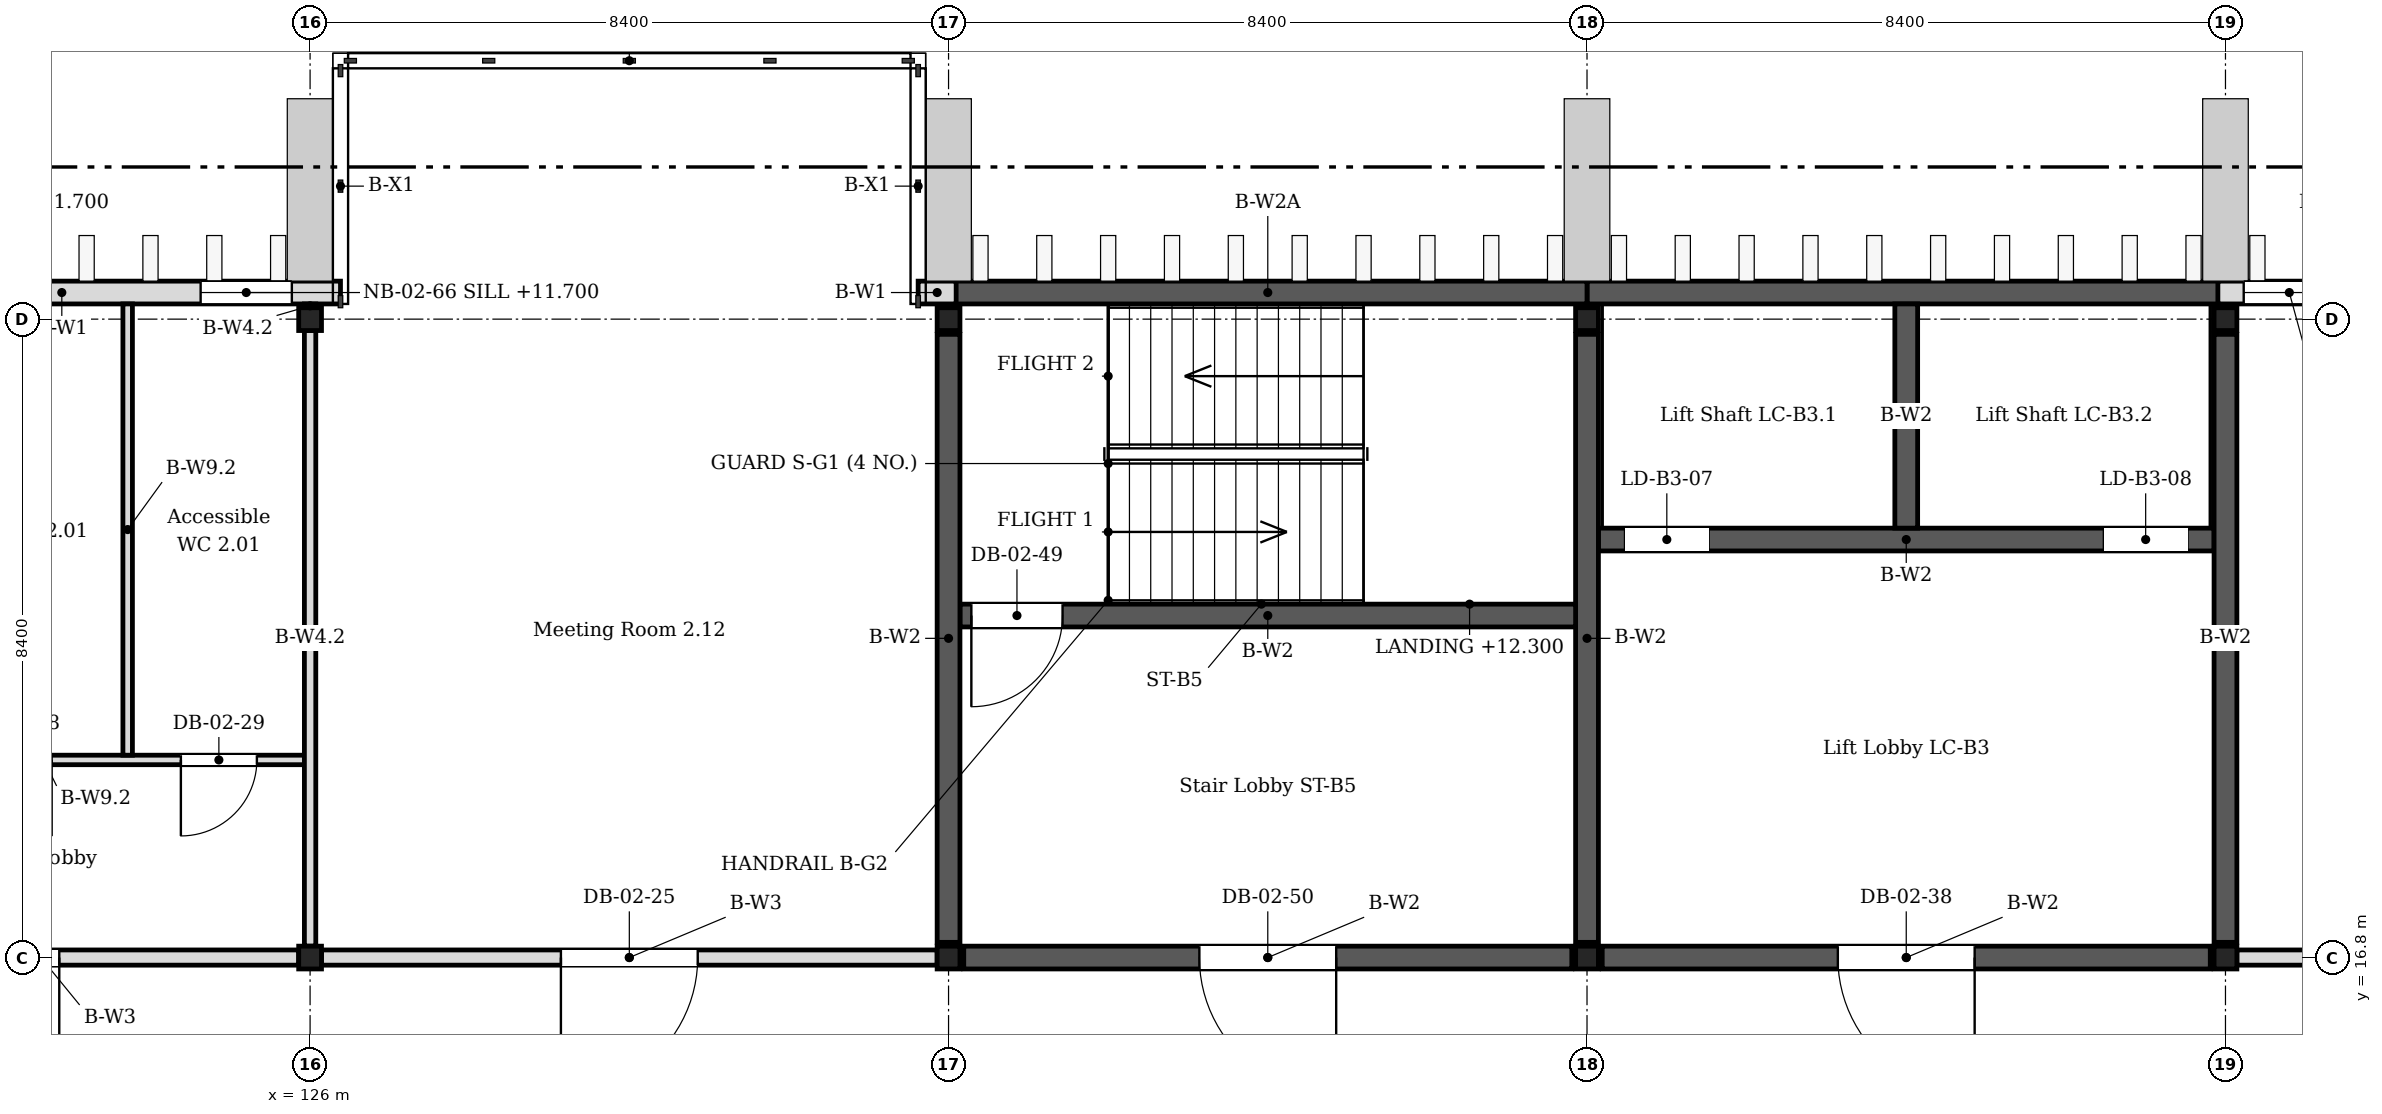
"""IFC4 building model, lengths in metres.
Left out: names, types, materials, properties, quantities, classifications, styles, units other than length and angle.
Written with IfcOpenShell. Run it as: python <this file> out.ifc"""

import sys

from ifc_helpers import new_model, si_unit, direction, frame, frame_2d, origin, origin_2d, place, context, subcontext, project, spatial, rectangle, i_section, extrude, element, fill, save


model = new_model("IFC4")
c1 = context("Model", 3, precision=1e-05, world=origin(), true_north=direction((0.0, 1.0)))
c2 = subcontext(c1, "Body", "Model", "MODEL_VIEW")
j1 = project(units=[si_unit("LENGTHUNIT", "METRE"), si_unit("PLANEANGLEUNIT", "RADIAN")], contexts=[c1])
p1 = place(None, origin())
s1 = spatial("IfcSite", under=j1, at=p1, CompositionType="ELEMENT")
p2 = place(p1, origin())
s2 = spatial("IfcBuilding", under=s1, at=p2, CompositionType="ELEMENT")
p3 = place(p2, frame((0.0, 0.0, 10.2)))
s3 = spatial("IfcBuildingStorey", under=s2, at=p3, CompositionType="ELEMENT", Elevation=10.2)
for number, where, z_axis, x_axis in (
    (1, (126.0, 16.8, 0.0), (0.0, 0.0, 1.0), (1.0, 0.0, 0.0)),
    (2, (126.0, 25.2, 0.0), (0.0, 0.0, 1.0), (1.0, 0.0, 0.0)),
    (3, (134.4, 16.8, 0.0), (0.0, 0.0, 1.0), (1.0, 0.0, 0.0)),
    (4, (134.4, 25.2, 0.0), (0.0, 0.0, 1.0), (1.0, 0.0, 0.0)),
    (5, (142.8, 16.8, 0.0), (0.0, 0.0, 1.0), (1.0, 0.0, 0.0)),
    (6, (142.8, 25.2, 0.0), (0.0, 0.0, 1.0), (1.0, 0.0, 0.0)),
    (7, (151.2, 16.8, 0.0), (0.0, 0.0, 1.0), (1.0, 0.0, 0.0)),
    (8, (151.2, 25.2, 0.0), (0.0, 0.0, 1.0), (1.0, 0.0, 0.0)),
):
    element("IfcColumn", number, at=place(p3, frame(where, z_axis=z_axis, x_axis=x_axis)), inside=s3, PredefinedType="COLUMN", context=c2, shape_type="SweptSolid", body=[
        extrude(i_section(OverallWidth=0.3, OverallDepth=0.3, WebThickness=0.01, FlangeThickness=0.015, FilletRadius=0.013, at=origin_2d()), origin(), (0.0, 0.0, 1.0), 4.2),
    ])
for number, where, z_axis, x_axis in (
    (9, (142.8, 17.0, 0.0), (0.0, 0.0, 1.0), (0.0, 1.0, 0.0)),
    (10, (151.2, 17.0, 0.0), (0.0, 0.0, 1.0), (0.0, 1.0, 0.0)),
):
    element("IfcWall", number, at=place(p3, frame(where, z_axis=z_axis, x_axis=x_axis)), inside=s3, PredefinedType="SHEAR", context=c2, shape_type="SweptSolid", body=[
        extrude(rectangle(XDim=8.0, YDim=0.3, at=frame_2d((4.0, 0.0))), origin(), (0.0, 0.0, 1.0), 4.05),
    ])
p4 = place(p3, frame((143.0, 16.8, 0.0), z_axis=(0.0, 0.0, 1.0), x_axis=(1.0, 0.0, 0.0)))
e11 = element("IfcWall", 11, at=p4, inside=s3, PredefinedType="SHEAR", context=c2, shape_type="SweptSolid", body=[
    extrude(rectangle(XDim=8.0, YDim=0.3, at=frame_2d((4.0, 0.0))), origin(), (0.0, 0.0, 1.0), 4.05),
])
p5 = place(p4, frame((3.1, 0.0, 0.0)))
e12 = element("IfcOpeningElement", 12, at=p5, cuts=e11, PredefinedType="OPENING", context=c2, shape_type="SweptSolid", body=[
    extrude(rectangle(XDim=1.8, YDim=2.1, at=frame_2d((0.9, 1.05))), frame((0.0, 0.16, 0.0), z_axis=(0.0, -1.0, 0.0), x_axis=(1.0, 0.0, 0.0)), (0.0, 0.0, 1.0), 0.32),
])
p6 = place(p3, frame((142.95, 22.3, 0.0), z_axis=(0.0, 0.0, 1.0), x_axis=(1.0, 0.0, 0.0)))
e13 = element("IfcWall", 13, at=p6, inside=s3, PredefinedType="SHEAR", context=c2, shape_type="SweptSolid", body=[
    extrude(rectangle(XDim=8.1, YDim=0.3, at=frame_2d((4.05, 0.0))), origin(), (0.0, 0.0, 1.0), 4.05),
])
p7 = place(p6, frame((0.35, 0.0, 0.0)))
e14 = element("IfcOpeningElement", 14, at=p7, cuts=e13, PredefinedType="OPENING", context=c2, shape_type="SweptSolid", body=[
    extrude(rectangle(XDim=1.1, YDim=2.2, at=frame_2d((0.55, 1.1))), frame((0.0, 0.16, 0.0), z_axis=(0.0, -1.0, 0.0), x_axis=(1.0, 0.0, 0.0)), (0.0, 0.0, 1.0), 0.32),
])
p8 = place(p6, frame((6.65, 0.0, 0.0)))
e15 = element("IfcOpeningElement", 15, at=p8, cuts=e13, PredefinedType="OPENING", context=c2, shape_type="SweptSolid", body=[
    extrude(rectangle(XDim=1.1, YDim=2.2, at=frame_2d((0.55, 1.1))), frame((0.0, 0.16, 0.0), z_axis=(0.0, -1.0, 0.0), x_axis=(1.0, 0.0, 0.0)), (0.0, 0.0, 1.0), 0.32),
])
p9 = place(p3, frame((142.8, 25.55, 0.0), z_axis=(0.0, 0.0, 1.0), x_axis=(1.0, 0.0, 0.0)))
e16 = element("IfcWall", 16, at=p9, inside=s3, PredefinedType="SHEAR", context=c2, shape_type="SweptSolid", body=[
    extrude(rectangle(XDim=8.4, YDim=0.3, at=frame_2d((4.2, 0.0))), origin(), (0.0, 0.0, 1.0), 4.05),
])
p10 = place(p3, frame((147.0, 22.45, 0.0), z_axis=(0.0, 0.0, 1.0), x_axis=(0.0, 1.0, 0.0)))
e17 = element("IfcWall", 17, at=p10, inside=s3, PredefinedType="SHEAR", context=c2, shape_type="SweptSolid", body=[
    extrude(rectangle(XDim=2.95, YDim=0.3, at=frame_2d((1.475, 0.0))), origin(), (0.0, 0.0, 1.0), 4.05),
])
p11 = place(p3, frame((134.4, 17.0, 0.0), z_axis=(0.0, 0.0, 1.0), x_axis=(0.0, 1.0, 0.0)))
e18 = element("IfcWall", 18, at=p11, inside=s3, PredefinedType="SHEAR", context=c2, shape_type="SweptSolid", body=[
    extrude(rectangle(XDim=8.0, YDim=0.3, at=frame_2d((4.0, 0.0))), origin(), (0.0, 0.0, 1.0), 4.05),
])
p12 = place(p3, frame((134.6, 16.8, 0.0), z_axis=(0.0, 0.0, 1.0), x_axis=(1.0, 0.0, 0.0)))
e19 = element("IfcWall", 19, at=p12, inside=s3, PredefinedType="SHEAR", context=c2, shape_type="SweptSolid", body=[
    extrude(rectangle(XDim=8.0, YDim=0.3, at=frame_2d((4.0, 0.0))), origin(), (0.0, 0.0, 1.0), 4.05),
])
p13 = place(p12, frame((3.1, 0.0, 0.0)))
e20 = element("IfcOpeningElement", 20, at=p13, cuts=e19, PredefinedType="OPENING", context=c2, shape_type="SweptSolid", body=[
    extrude(rectangle(XDim=1.8, YDim=2.1, at=frame_2d((0.9, 1.05))), frame((0.0, 0.16, 0.0), z_axis=(0.0, -1.0, 0.0), x_axis=(1.0, 0.0, 0.0)), (0.0, 0.0, 1.0), 0.32),
])
p14 = place(p3, frame((134.55, 21.3, 0.0), z_axis=(0.0, 0.0, 1.0), x_axis=(1.0, 0.0, 0.0)))
e21 = element("IfcWall", 21, at=p14, inside=s3, PredefinedType="SHEAR", context=c2, shape_type="SweptSolid", body=[
    extrude(rectangle(XDim=8.1, YDim=0.3, at=frame_2d((4.05, 0.0))), origin(), (0.0, 0.0, 1.0), 4.05),
])
p15 = place(p14, frame((0.15, 0.0, 0.0)))
e22 = element("IfcOpeningElement", 22, at=p15, cuts=e21, PredefinedType="OPENING", context=c2, shape_type="SweptSolid", body=[
    extrude(rectangle(XDim=1.2, YDim=2.1, at=frame_2d((0.6, 1.05))), frame((0.0, 0.16, 0.0), z_axis=(0.0, -1.0, 0.0), x_axis=(1.0, 0.0, 0.0)), (0.0, 0.0, 1.0), 0.32),
])
p16 = place(p3, frame((134.4, 25.55, 0.0), z_axis=(0.0, 0.0, 1.0), x_axis=(1.0, 0.0, 0.0)))
e23 = element("IfcWall", 23, at=p16, inside=s3, PredefinedType="SHEAR", context=c2, shape_type="SweptSolid", body=[
    extrude(rectangle(XDim=8.4, YDim=0.3, at=frame_2d((4.2, 0.0))), origin(), (0.0, 0.0, 1.0), 4.05),
])
p17 = place(p3, frame((117.5, 25.55, 0.0), z_axis=(0.0, 0.0, 1.0), x_axis=(1.0, 0.0, 0.0)))
e24 = element("IfcWall", 24, at=p17, inside=s3, PredefinedType="SOLIDWALL", context=c2, shape_type="SweptSolid", body=[
    extrude(rectangle(XDim=8.9, YDim=0.3, at=frame_2d((4.45, 0.0))), origin(), (0.0, 0.0, 1.0), 4.05),
])
p18 = place(p17, frame((0.34, 0.0, 1.5)))
e25 = element("IfcOpeningElement", 25, at=p18, cuts=e24, PredefinedType="OPENING", context=c2, shape_type="SweptSolid", body=[
    extrude(rectangle(XDim=1.2, YDim=1.2, at=frame_2d((0.6, 0.6))), frame((0.0, 0.16, 0.0), z_axis=(0.0, -1.0, 0.0), x_axis=(1.0, 0.0, 0.0)), (0.0, 0.0, 1.0), 0.32),
])
p19 = place(p17, frame((3.7, 0.0, 1.5)))
e26 = element("IfcOpeningElement", 26, at=p19, cuts=e24, PredefinedType="OPENING", context=c2, shape_type="SweptSolid", body=[
    extrude(rectangle(XDim=1.2, YDim=1.2, at=frame_2d((0.6, 0.6))), frame((0.0, 0.16, 0.0), z_axis=(0.0, -1.0, 0.0), x_axis=(1.0, 0.0, 0.0)), (0.0, 0.0, 1.0), 0.32),
])
p20 = place(p17, frame((7.06, 0.0, 1.5)))
e27 = element("IfcOpeningElement", 27, at=p20, cuts=e24, PredefinedType="OPENING", context=c2, shape_type="SweptSolid", body=[
    extrude(rectangle(XDim=1.2, YDim=1.2, at=frame_2d((0.6, 0.6))), frame((0.0, 0.16, 0.0), z_axis=(0.0, -1.0, 0.0), x_axis=(1.0, 0.0, 0.0)), (0.0, 0.0, 1.0), 0.32),
])
p21 = place(p3, frame((134.0, 25.55, 0.0), z_axis=(0.0, 0.0, 1.0), x_axis=(1.0, 0.0, 0.0)))
e28 = element("IfcWall", 28, at=p21, inside=s3, PredefinedType="SOLIDWALL", context=c2, shape_type="SweptSolid", body=[
    extrude(rectangle(XDim=0.5, YDim=0.3, at=frame_2d((0.25, 0.0))), origin(), (0.0, 0.0, 1.0), 4.05),
])
p22 = place(p3, frame((151.1, 25.55, 0.0), z_axis=(0.0, 0.0, 1.0), x_axis=(1.0, 0.0, 0.0)))
e29 = element("IfcWall", 29, at=p22, inside=s3, PredefinedType="SOLIDWALL", context=c2, shape_type="SweptSolid", body=[
    extrude(rectangle(XDim=5.9, YDim=0.3, at=frame_2d((2.95, 0.0))), origin(), (0.0, 0.0, 1.0), 4.05),
])
p23 = place(p22, frame((0.34, 0.0, 1.5)))
e30 = element("IfcOpeningElement", 30, at=p23, cuts=e29, PredefinedType="OPENING", context=c2, shape_type="SweptSolid", body=[
    extrude(rectangle(XDim=1.2, YDim=1.2, at=frame_2d((0.6, 0.6))), frame((0.0, 0.16, 0.0), z_axis=(0.0, -1.0, 0.0), x_axis=(1.0, 0.0, 0.0)), (0.0, 0.0, 1.0), 0.32),
])
p24 = place(p22, frame((2.02, 0.0, 1.5)))
e31 = element("IfcOpeningElement", 31, at=p24, cuts=e29, PredefinedType="OPENING", context=c2, shape_type="SweptSolid", body=[
    extrude(rectangle(XDim=1.2, YDim=1.2, at=frame_2d((0.6, 0.6))), frame((0.0, 0.16, 0.0), z_axis=(0.0, -1.0, 0.0), x_axis=(1.0, 0.0, 0.0)), (0.0, 0.0, 1.0), 0.32),
])
p25 = place(p22, frame((3.7, 0.0, 1.5)))
e32 = element("IfcOpeningElement", 32, at=p25, cuts=e29, PredefinedType="OPENING", context=c2, shape_type="SweptSolid", body=[
    extrude(rectangle(XDim=1.2, YDim=1.2, at=frame_2d((0.6, 0.6))), frame((0.0, 0.16, 0.0), z_axis=(0.0, -1.0, 0.0), x_axis=(1.0, 0.0, 0.0)), (0.0, 0.0, 1.0), 0.32),
])
p26 = place(p3, frame((117.75, 16.8, 0.0), z_axis=(0.0, 0.0, 1.0), x_axis=(1.0, 0.0, 0.0)))
e33 = element("IfcWall", 33, at=p26, inside=s3, PredefinedType="PARTITIONING", context=c2, shape_type="SweptSolid", body=[
    extrude(rectangle(XDim=8.1, YDim=0.2, at=frame_2d((4.05, 0.0))), origin(), (0.0, 0.0, 1.0), 3.35),
])
p27 = place(p26, frame((3.15, 0.0, 0.0)))
e34 = element("IfcOpeningElement", 34, at=p27, cuts=e33, PredefinedType="OPENING", context=c2, shape_type="SweptSolid", body=[
    extrude(rectangle(XDim=1.8, YDim=2.1, at=frame_2d((0.9, 1.05))), frame((0.0, 0.11, 0.0), z_axis=(0.0, -1.0, 0.0), x_axis=(1.0, 0.0, 0.0)), (0.0, 0.0, 1.0), 0.22),
])
p28 = place(p3, frame((126.15, 16.8, 0.0), z_axis=(0.0, 0.0, 1.0), x_axis=(1.0, 0.0, 0.0)))
e35 = element("IfcWall", 35, at=p28, inside=s3, PredefinedType="PARTITIONING", context=c2, shape_type="SweptSolid", body=[
    extrude(rectangle(XDim=8.1, YDim=0.2, at=frame_2d((4.05, 0.0))), origin(), (0.0, 0.0, 1.0), 3.35),
])
p29 = place(p28, frame((3.15, 0.0, 0.0)))
e36 = element("IfcOpeningElement", 36, at=p29, cuts=e35, PredefinedType="OPENING", context=c2, shape_type="SweptSolid", body=[
    extrude(rectangle(XDim=1.8, YDim=2.1, at=frame_2d((0.9, 1.05))), frame((0.0, 0.11, 0.0), z_axis=(0.0, -1.0, 0.0), x_axis=(1.0, 0.0, 0.0)), (0.0, 0.0, 1.0), 0.22),
])
p30 = place(p3, frame((151.35, 16.8, 0.0), z_axis=(0.0, 0.0, 1.0), x_axis=(1.0, 0.0, 0.0)))
e37 = element("IfcWall", 37, at=p30, inside=s3, PredefinedType="PARTITIONING", context=c2, shape_type="SweptSolid", body=[
    extrude(rectangle(XDim=5.85, YDim=0.2, at=frame_2d((2.925, 0.0))), origin(), (0.0, 0.0, 1.0), 3.35),
])
p31 = place(p30, frame((3.55, 0.0, 0.0)))
e38 = element("IfcOpeningElement", 38, at=p31, cuts=e37, PredefinedType="OPENING", context=c2, shape_type="SweptSolid", body=[
    extrude(rectangle(XDim=1.0, YDim=2.1, at=frame_2d((0.5, 1.05))), frame((0.0, 0.11, 0.0), z_axis=(0.0, -1.0, 0.0), x_axis=(1.0, 0.0, 0.0)), (0.0, 0.0, 1.0), 0.22),
])
p32 = place(p3, frame((117.75, 19.4, 0.0), z_axis=(0.0, 0.0, 1.0), x_axis=(1.0, 0.0, 0.0)))
e39 = element("IfcWall", 39, at=p32, inside=s3, PredefinedType="PARTITIONING", context=c2, shape_type="SweptSolid", body=[
    extrude(rectangle(XDim=8.175, YDim=0.125, at=frame_2d((4.087, 0.0))), origin(), (0.0, 0.0, 1.0), 3.35),
])
p33 = place(p32, frame((0.85, 0.0, 0.0)))
e40 = element("IfcOpeningElement", 40, at=p33, cuts=e39, PredefinedType="OPENING", context=c2, shape_type="SweptSolid", body=[
    extrude(rectangle(XDim=1.0, YDim=2.1, at=frame_2d((0.5, 1.05))), frame((0.0, 0.073, 0.0), z_axis=(0.0, -1.0, 0.0), x_axis=(1.0, 0.0, 0.0)), (0.0, 0.0, 1.0), 0.145),
])
p34 = place(p32, frame((3.85, 0.0, 0.0)))
e41 = element("IfcOpeningElement", 41, at=p34, cuts=e39, PredefinedType="OPENING", context=c2, shape_type="SweptSolid", body=[
    extrude(rectangle(XDim=1.0, YDim=2.1, at=frame_2d((0.5, 1.05))), frame((0.0, 0.073, 0.0), z_axis=(0.0, -1.0, 0.0), x_axis=(1.0, 0.0, 0.0)), (0.0, 0.0, 1.0), 0.145),
])
p35 = place(p32, frame((6.55, 0.0, 0.0)))
e42 = element("IfcOpeningElement", 42, at=p35, cuts=e39, PredefinedType="OPENING", context=c2, shape_type="SweptSolid", body=[
    extrude(rectangle(XDim=1.0, YDim=2.1, at=frame_2d((0.5, 1.05))), frame((0.0, 0.073, 0.0), z_axis=(0.0, -1.0, 0.0), x_axis=(1.0, 0.0, 0.0)), (0.0, 0.0, 1.0), 0.145),
])
p36 = place(p3, frame((123.6, 19.462, 0.0), z_axis=(0.0, 0.0, 1.0), x_axis=(0.0, 1.0, 0.0)))
e43 = element("IfcWall", 43, at=p36, inside=s3, PredefinedType="PARTITIONING", context=c2, shape_type="SweptSolid", body=[
    extrude(rectangle(XDim=5.938, YDim=0.125, at=frame_2d((2.969, 0.0))), origin(), (0.0, 0.0, 1.0), 3.35),
])
p37 = place(p3, frame((126.0, 16.95, 0.0), z_axis=(0.0, 0.0, 1.0), x_axis=(0.0, 1.0, 0.0)))
e44 = element("IfcWall", 44, at=p37, inside=s3, PredefinedType="PARTITIONING", context=c2, shape_type="SweptSolid", body=[
    extrude(rectangle(XDim=8.1, YDim=0.15, at=frame_2d((4.05, 0.0))), origin(), (0.0, 0.0, 1.0), 3.35),
])
p38 = place(p3, frame((126.0, 25.35, 0.0), z_axis=(0.0, 0.0, 1.0), x_axis=(0.0, 1.0, 0.0)))
e45 = element("IfcWall", 45, at=p38, inside=s3, PredefinedType="PARTITIONING", context=c2, shape_type="SweptSolid", body=[
    extrude(rectangle(XDim=0.05, YDim=0.15, at=frame_2d((0.025, 0.0))), origin(), (0.0, 0.0, 1.0), 3.35),
])
p39 = place(p20, origin())
e46 = element("IfcWindow", 46, at=p39, inside=s3, PartitioningType="SINGLE_PANEL", PredefinedType="WINDOW", context=c2, shape_type="SweptSolid", body=[
    extrude(rectangle(XDim=1.2, YDim=1.2, at=frame_2d((0.6, 0.6))), frame((0.0, 0.03, 0.0), z_axis=(0.0, -1.0, 0.0), x_axis=(1.0, 0.0, 0.0)), (0.0, 0.0, 1.0), 0.06),
])
fill(e27, e46)
p40 = place(p23, origin())
e47 = element("IfcWindow", 47, at=p40, inside=s3, PartitioningType="SINGLE_PANEL", PredefinedType="WINDOW", context=c2, shape_type="SweptSolid", body=[
    extrude(rectangle(XDim=1.2, YDim=1.2, at=frame_2d((0.6, 0.6))), frame((0.0, 0.03, 0.0), z_axis=(0.0, -1.0, 0.0), x_axis=(1.0, 0.0, 0.0)), (0.0, 0.0, 1.0), 0.06),
])
fill(e30, e47)
p41 = place(p27, origin())
e48 = element("IfcDoor", 48, at=p41, inside=s3, OperationType="DOUBLE_DOOR_SINGLE_SWING", PredefinedType="DOOR", context=c2, shape_type="SweptSolid", body=[
    extrude(rectangle(XDim=1.8, YDim=2.1, at=frame_2d((0.9, 1.05))), frame((0.0, 0.025, 0.0), z_axis=(0.0, -1.0, 0.0), x_axis=(1.0, 0.0, 0.0)), (0.0, 0.0, 1.0), 0.05),
])
fill(e34, e48)
p42 = place(p29, origin())
e49 = element("IfcDoor", 49, at=p42, inside=s3, OperationType="DOUBLE_DOOR_SINGLE_SWING", PredefinedType="DOOR", context=c2, shape_type="SweptSolid", body=[
    extrude(rectangle(XDim=1.8, YDim=2.1, at=frame_2d((0.9, 1.05))), frame((0.0, 0.025, 0.0), z_axis=(0.0, -1.0, 0.0), x_axis=(1.0, 0.0, 0.0)), (0.0, 0.0, 1.0), 0.05),
])
fill(e36, e49)
p43 = place(p35, origin())
e50 = element("IfcDoor", 50, at=p43, inside=s3, OperationType="SINGLE_SWING_LEFT", PredefinedType="DOOR", context=c2, shape_type="SweptSolid", body=[
    extrude(rectangle(XDim=1.0, YDim=2.1, at=frame_2d((0.5, 1.05))), frame((0.0, 0.025, 0.0), z_axis=(0.0, -1.0, 0.0), x_axis=(1.0, 0.0, 0.0)), (0.0, 0.0, 1.0), 0.05),
])
fill(e42, e50)
p44 = place(p5, origin())
e51 = element("IfcDoor", 51, at=p44, inside=s3, OperationType="DOUBLE_DOOR_SINGLE_SWING", PredefinedType="DOOR", context=c2, shape_type="SweptSolid", body=[
    extrude(rectangle(XDim=1.8, YDim=2.1, at=frame_2d((0.9, 1.05))), frame((0.0, 0.025, 0.0), z_axis=(0.0, -1.0, 0.0), x_axis=(1.0, 0.0, 0.0)), (0.0, 0.0, 1.0), 0.05),
])
fill(e12, e51)
p45 = place(p7, origin())
e52 = element("IfcDoor", 52, at=p45, inside=s3, OperationType="SLIDING_TO_LEFT", PredefinedType="DOOR", context=c2, shape_type="SweptSolid", body=[
    extrude(rectangle(XDim=1.1, YDim=2.2, at=frame_2d((0.55, 1.1))), frame((0.0, 0.025, 0.0), z_axis=(0.0, -1.0, 0.0), x_axis=(1.0, 0.0, 0.0)), (0.0, 0.0, 1.0), 0.05),
])
fill(e14, e52)
p46 = place(p8, origin())
e53 = element("IfcDoor", 53, at=p46, inside=s3, OperationType="SLIDING_TO_LEFT", PredefinedType="DOOR", context=c2, shape_type="SweptSolid", body=[
    extrude(rectangle(XDim=1.1, YDim=2.2, at=frame_2d((0.55, 1.1))), frame((0.0, 0.025, 0.0), z_axis=(0.0, -1.0, 0.0), x_axis=(1.0, 0.0, 0.0)), (0.0, 0.0, 1.0), 0.05),
])
fill(e15, e53)
p47 = place(p15, origin())
e54 = element("IfcDoor", 54, at=p47, inside=s3, OperationType="SINGLE_SWING_LEFT", PredefinedType="DOOR", context=c2, shape_type="SweptSolid", body=[
    extrude(rectangle(XDim=1.2, YDim=2.1, at=frame_2d((0.6, 1.05))), frame((0.0, 0.025, 0.0), z_axis=(0.0, -1.0, 0.0), x_axis=(1.0, 0.0, 0.0)), (0.0, 0.0, 1.0), 0.05),
])
fill(e22, e54)
p48 = place(p13, origin())
e55 = element("IfcDoor", 55, at=p48, inside=s3, OperationType="DOUBLE_DOOR_SINGLE_SWING", PredefinedType="DOOR", context=c2, shape_type="SweptSolid", body=[
    extrude(rectangle(XDim=1.8, YDim=2.1, at=frame_2d((0.9, 1.05))), frame((0.0, 0.025, 0.0), z_axis=(0.0, -1.0, 0.0), x_axis=(1.0, 0.0, 0.0)), (0.0, 0.0, 1.0), 0.05),
])
fill(e20, e55)
save(model, sys.argv[1])
